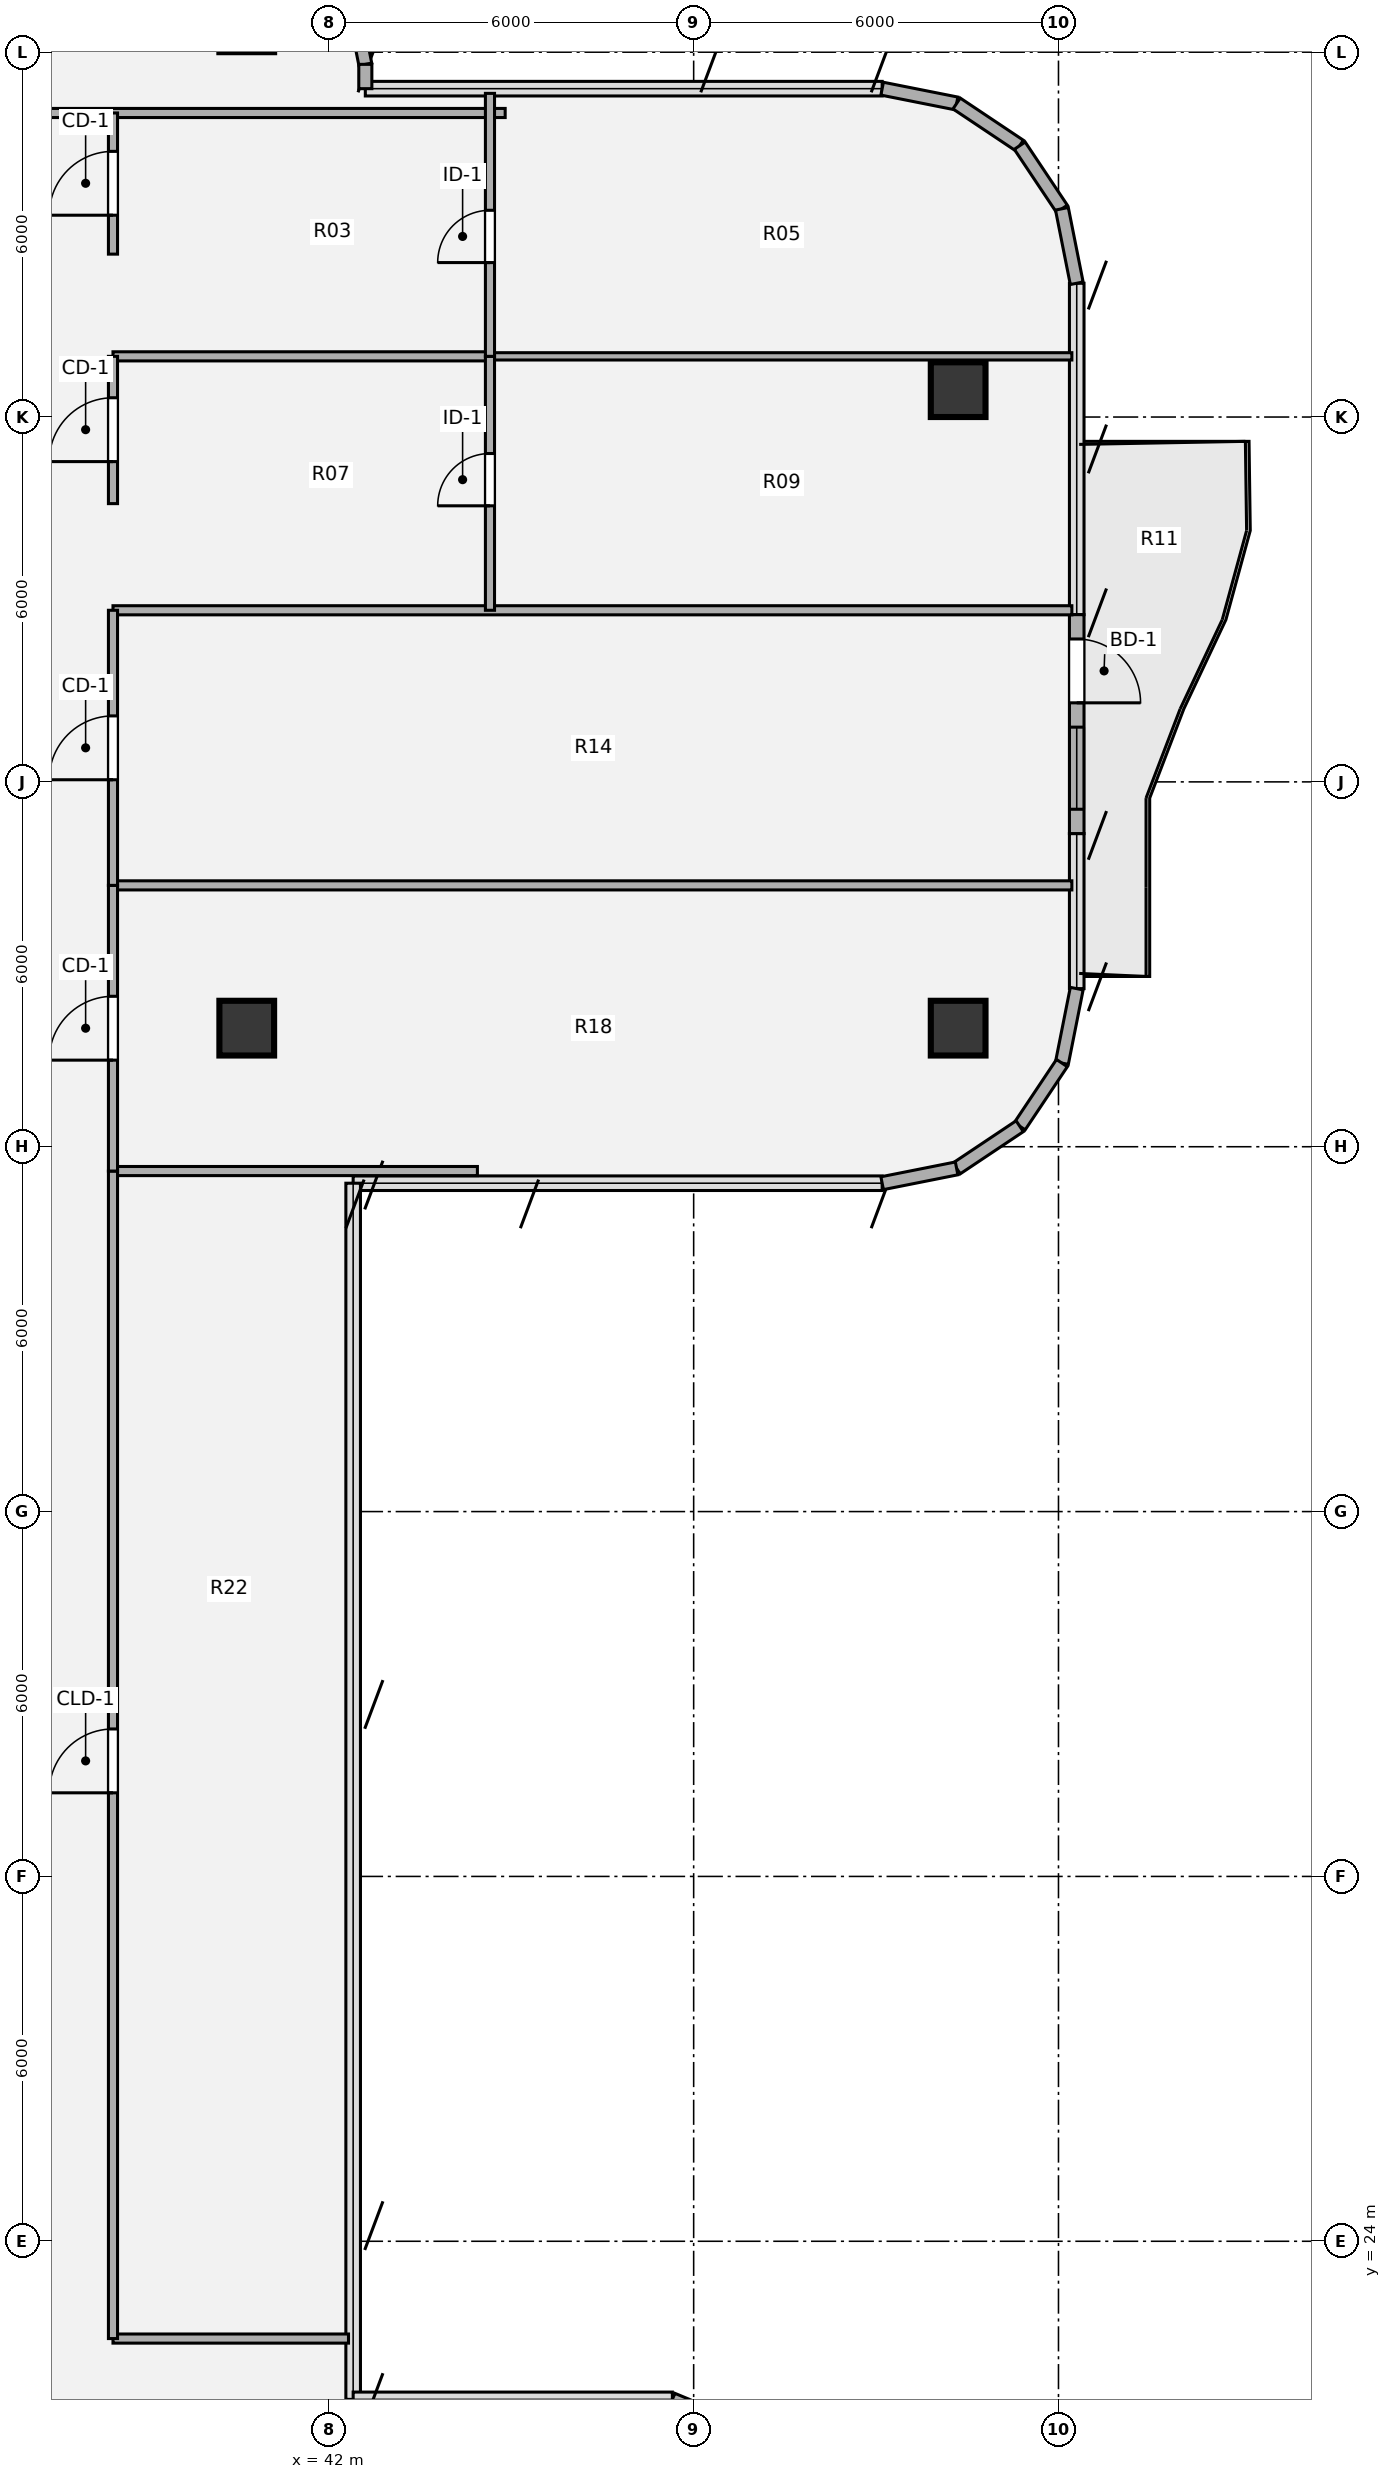
"""IFC4 building model, lengths in metres.
Left out: names, types, materials, properties, quantities, classifications, styles, units other than length and angle.
Written with IfcOpenShell. Run it as: python <this file> out.ifc"""

import sys

from ifc_helpers import new_model, si_unit, direction, frame, frame_2d, origin, origin_2d, place, context, subcontext, project, spatial, rectangle, hollow_circle, extrude, source, transform, mapped, element, fill, save


model = new_model("IFC4")
c1 = context("Model", 3, precision=1e-05, world=origin(), true_north=direction((0.0, 1.0)))
c2 = subcontext(c1, "Body", "Model", "MODEL_VIEW")
j1 = project(units=[si_unit("LENGTHUNIT", "METRE"), si_unit("PLANEANGLEUNIT", "RADIAN")], contexts=[c1])
p1 = place(None, origin())
s1 = spatial("IfcSite", under=j1, at=p1, CompositionType="ELEMENT")
p2 = place(p1, origin())
s2 = spatial("IfcBuilding", under=s1, at=p2, CompositionType="ELEMENT")
p3 = place(p2, frame((0.0, 0.0, 268.38)))
s3 = spatial("IfcBuildingStorey", under=s2, at=p3, CompositionType="ELEMENT", Elevation=268.38)
m1 = source(origin(), c2, "Body", "SweptSolid", [
    extrude(hollow_circle(Radius=0.45, WallThickness=0.032, at=origin_2d()), origin(), (0.0, 0.0, 1.0), 3.78),
])
for number, where, z_axis, x_axis in (
    (1, (52.35, 43.95, 0.0), (0.0, 0.0, 1.0), (1.0, 0.0, 0.0)),
    (2, (52.35, 54.45, 0.0), (0.0, 0.0, 1.0), (1.0, 0.0, 0.0)),
    (3, (40.65, 43.95, 0.0), (0.0, 0.0, 1.0), (1.0, 0.0, 0.0)),
):
    element("IfcColumn", number, at=place(p3, frame(where, z_axis=z_axis, x_axis=x_axis)), inside=s3, PredefinedType="COLUMN", context=c2, shape_type="MappedRepresentation", body=[
        mapped(m1, transform((0.0, 0.0, 0.0), x_axis=(1.0, 0.0, 0.0), y_axis=(0.0, 1.0, 0.0), z_axis=(0.0, 0.0, 1.0), scale=1.0)),
    ])
p4 = place(p3, frame((42.402, 60.795, 0.0), z_axis=(0.0, 0.0, 1.0), x_axis=(0.195190360752, -0.980765376158, 0.0)))
e4 = element("IfcWall", 4, at=p4, inside=s3, PredefinedType="SOLIDWALL", context=c2, shape_type="SweptSolid", body=[
    extrude(rectangle(XDim=1.014, YDim=0.215, at=frame_2d((0.507, 0.0))), origin(), (0.0, 0.0, 1.0), 3.53),
])
p5 = place(p3, frame((42.6, 59.8, 0.0), z_axis=(0.0, 0.0, 1.0), x_axis=(0.0, -1.0, 0.0)))
e5 = element("IfcWall", 5, at=p5, inside=s3, PredefinedType="SOLIDWALL", context=c2, shape_type="SweptSolid", body=[
    extrude(rectangle(XDim=0.4, YDim=0.215, at=frame_2d((0.2, 0.0))), origin(), (0.0, 0.0, 1.0), 3.53),
])
for number, where, z_axis, x_axis in (
    (6, (51.1, 59.4, 0.0), (0.0, 0.0, 1.0), (0.981, -0.195, 0.0)),
    (7, (52.325, 59.156, 0.0), (0.0, 0.0, 1.0), (0.831, -0.556, 0.0)),
    (8, (53.363, 58.463, 0.0), (0.0, 0.0, 1.0), (0.556, -0.831, 0.0)),
    (9, (54.056, 57.425, 0.0), (0.0, 0.0, 1.0), (0.195, -0.981, 0.0)),
):
    element("IfcWall", number, at=place(p3, frame(where, z_axis=z_axis, x_axis=x_axis)), inside=s3, PredefinedType="SOLIDWALL", context=c2, shape_type="SweptSolid", body=[
        extrude(rectangle(XDim=1.249, YDim=0.215, at=frame_2d((0.624, 0.0))), origin(), (0.0, 0.0, 1.0), 3.53),
    ])
p6 = place(p3, frame((54.3, 50.75, 0.0), z_axis=(0.0, 0.0, 1.0), x_axis=(0.0, -1.0, 0.0)))
e10 = element("IfcWall", 10, at=p6, inside=s3, PredefinedType="SOLIDWALL", context=c2, shape_type="SweptSolid", body=[
    extrude(rectangle(XDim=3.6, YDim=0.24, at=frame_2d((1.8, 0.0))), origin(), (0.0, 0.0, 1.0), 3.53),
])
p7 = place(p6, frame((0.4, 0.0, 0.0)))
e11 = element("IfcOpeningElement", 11, at=p7, cuts=e10, PredefinedType="OPENING", context=c2, shape_type="SweptSolid", body=[
    extrude(rectangle(XDim=1.05, YDim=2.15, at=origin_2d()), frame((0.525, 0.13, 1.075), z_axis=(0.0, -1.0, 0.0), x_axis=(1.0, 0.0, 0.0)), (0.0, 0.0, 1.0), 0.26),
])
p8 = place(p6, frame((1.85, 0.0, 0.85)))
e12 = element("IfcOpeningElement", 12, at=p8, cuts=e10, PredefinedType="OPENING", context=c2, shape_type="SweptSolid", body=[
    extrude(rectangle(XDim=1.35, YDim=1.35, at=origin_2d()), frame((0.675, 0.13, 0.675), z_axis=(0.0, -1.0, 0.0), x_axis=(1.0, 0.0, 0.0)), (0.0, 0.0, 1.0), 0.26),
])
for number, where, z_axis, x_axis in (
    (13, (54.3, 44.6, 0.0), (0.0, 0.0, 1.0), (-0.195, -0.981, 0.0)),
    (14, (54.056, 43.375, 0.0), (0.0, 0.0, 1.0), (-0.556, -0.831, 0.0)),
    (15, (53.363, 42.337, 0.0), (0.0, 0.0, 1.0), (-0.831, -0.556, 0.0)),
    (16, (52.325, 41.644, 0.0), (0.0, 0.0, 1.0), (-0.981, -0.195, 0.0)),
):
    element("IfcWall", number, at=place(p3, frame(where, z_axis=z_axis, x_axis=x_axis)), inside=s3, PredefinedType="SOLIDWALL", context=c2, shape_type="SweptSolid", body=[
        extrude(rectangle(XDim=1.249, YDim=0.215, at=frame_2d((0.624, 0.0))), origin(), (0.0, 0.0, 1.0), 3.53),
    ])
p9 = place(p3, frame((47.65, 21.4, 0.0), z_axis=(0.0, 0.0, 1.0), x_axis=(0.924205486139, -0.381895560841, 0.0)))
e17 = element("IfcWall", 17, at=p9, inside=s3, PredefinedType="SOLIDWALL", context=c2, shape_type="SweptSolid", body=[
    extrude(rectangle(XDim=0.268, YDim=0.215, at=frame_2d((0.134, 0.0))), origin(), (0.0, 0.0, 1.0), 3.53),
])
p10 = place(p3, frame((38.45, 22.4, 0.0), z_axis=(0.0, 0.0, 1.0), x_axis=(1.0, 0.0, 0.0)))
e18 = element("IfcWall", 18, at=p10, inside=s3, PredefinedType="PARTITIONING", context=c2, shape_type="SweptSolid", body=[
    extrude(rectangle(XDim=3.873, YDim=0.15, at=frame_2d((1.937, 0.0))), origin(), (0.0, 0.0, 1.0), 3.5),
])
p11 = place(p3, frame((38.45, 41.6, 0.0), z_axis=(0.0, 0.0, 1.0), x_axis=(1.0, 0.0, 0.0)))
e19 = element("IfcWall", 19, at=p11, inside=s3, PredefinedType="PARTITIONING", context=c2, shape_type="SweptSolid", body=[
    extrude(rectangle(XDim=5.993, YDim=0.15, at=frame_2d((2.997, 0.0))), origin(), (0.0, 0.0, 1.0), 3.5),
])
p12 = place(p3, frame((38.45, 46.298, 0.0), z_axis=(0.0, 0.0, 1.0), x_axis=(1.0, 0.0, 0.0)))
e20 = element("IfcWall", 20, at=p12, inside=s3, PredefinedType="PARTITIONING", context=c2, shape_type="SweptSolid", body=[
    extrude(rectangle(XDim=15.77, YDim=0.15, at=frame_2d((7.885, 0.0))), origin(), (0.0, 0.0, 1.0), 3.055),
])
p13 = place(p3, frame((38.45, 50.822, 0.0), z_axis=(0.0, 0.0, 1.0), x_axis=(1.0, 0.0, 0.0)))
e21 = element("IfcWall", 21, at=p13, inside=s3, PredefinedType="PARTITIONING", context=c2, shape_type="SweptSolid", body=[
    extrude(rectangle(XDim=15.77, YDim=0.15, at=frame_2d((7.885, 0.0))), origin(), (0.0, 0.0, 1.0), 2.982),
])
p14 = place(p3, frame((38.45, 54.998, 0.0), z_axis=(0.0, 0.0, 1.0), x_axis=(1.0, 0.0, 0.0)))
e22 = element("IfcWall", 22, at=p14, inside=s3, PredefinedType="PARTITIONING", context=c2, shape_type="SweptSolid", body=[
    extrude(rectangle(XDim=6.2, YDim=0.15, at=frame_2d((3.1, 0.0))), origin(), (0.0, 0.0, 1.0), 3.259),
])
p15 = place(p3, frame((44.65, 54.998, 0.0), z_axis=(0.0, 0.0, 1.0), x_axis=(1.0, 0.0, 0.0)))
e23 = element("IfcWall", 23, at=p15, inside=s3, PredefinedType="PARTITIONING", context=c2, shape_type="SweptSolid", body=[
    extrude(rectangle(XDim=9.57, YDim=0.12, at=frame_2d((4.785, 0.0))), origin(), (0.0, 0.0, 1.0), 3.5),
])
p16 = place(p3, frame((27.1, 59.0, 0.0), z_axis=(0.0, 0.0, 1.0), x_axis=(1.0, 0.0, 0.0)))
e24 = element("IfcWall", 24, at=p16, inside=s3, PredefinedType="PARTITIONING", context=c2, shape_type="SweptSolid", body=[
    extrude(rectangle(XDim=17.8, YDim=0.15, at=frame_2d((8.9, 0.0))), origin(), (0.0, 0.0, 1.0), 3.308),
])
p17 = place(p16, frame((8.375, 0.0, 0.0)))
e25 = element("IfcOpeningElement", 25, at=p17, cuts=e24, PredefinedType="OPENING", context=c2, shape_type="SweptSolid", body=[
    extrude(rectangle(XDim=1.05, YDim=2.1, at=origin_2d()), frame((0.525, 0.085, 1.05), z_axis=(0.0, -1.0, 0.0), x_axis=(1.0, 0.0, 0.0)), (0.0, 0.0, 1.0), 0.17),
])
p18 = place(p3, frame((38.45, 22.4, 0.0), z_axis=(0.0, 0.0, 1.0), x_axis=(0.0, 1.0, 0.0)))
e26 = element("IfcWall", 26, at=p18, inside=s3, PredefinedType="PARTITIONING", context=c2, shape_type="SweptSolid", body=[
    extrude(rectangle(XDim=19.2, YDim=0.15, at=frame_2d((9.6, 0.0))), origin(), (0.0, 0.0, 1.0), 3.5),
])
p19 = place(p18, frame((8.975, 0.0, 0.0)))
e27 = element("IfcOpeningElement", 27, at=p19, cuts=e26, PredefinedType="OPENING", context=c2, shape_type="SweptSolid", body=[
    extrude(rectangle(XDim=1.05, YDim=2.1, at=origin_2d()), frame((0.525, 0.085, 1.05), z_axis=(0.0, -1.0, 0.0), x_axis=(1.0, 0.0, 0.0)), (0.0, 0.0, 1.0), 0.17),
])
p20 = place(p3, frame((38.45, 41.6, 0.0), z_axis=(0.0, 0.0, 1.0), x_axis=(0.0, 1.0, 0.0)))
e28 = element("IfcWall", 28, at=p20, inside=s3, PredefinedType="PARTITIONING", context=c2, shape_type="SweptSolid", body=[
    extrude(rectangle(XDim=4.698, YDim=0.15, at=frame_2d((2.349, 0.0))), origin(), (0.0, 0.0, 1.0), 3.5),
])
p21 = place(p20, frame((1.824, 0.0, 0.0)))
e29 = element("IfcOpeningElement", 29, at=p21, cuts=e28, PredefinedType="OPENING", context=c2, shape_type="SweptSolid", body=[
    extrude(rectangle(XDim=1.05, YDim=2.1, at=origin_2d()), frame((0.525, 0.085, 1.05), z_axis=(0.0, -1.0, 0.0), x_axis=(1.0, 0.0, 0.0)), (0.0, 0.0, 1.0), 0.17),
])
p22 = place(p3, frame((38.45, 46.298, 0.0), z_axis=(0.0, 0.0, 1.0), x_axis=(0.0, 1.0, 0.0)))
e30 = element("IfcWall", 30, at=p22, inside=s3, PredefinedType="PARTITIONING", context=c2, shape_type="SweptSolid", body=[
    extrude(rectangle(XDim=4.524, YDim=0.15, at=frame_2d((2.262, 0.0))), origin(), (0.0, 0.0, 1.0), 3.5),
])
p23 = place(p22, frame((1.737, 0.0, 0.0)))
e31 = element("IfcOpeningElement", 31, at=p23, cuts=e30, PredefinedType="OPENING", context=c2, shape_type="SweptSolid", body=[
    extrude(rectangle(XDim=1.05, YDim=2.1, at=origin_2d()), frame((0.525, 0.085, 1.05), z_axis=(0.0, -1.0, 0.0), x_axis=(1.0, 0.0, 0.0)), (0.0, 0.0, 1.0), 0.17),
])
p24 = place(p3, frame((38.45, 52.576, 0.0), z_axis=(0.0, 0.0, 1.0), x_axis=(0.0, 1.0, 0.0)))
e32 = element("IfcWall", 32, at=p24, inside=s3, PredefinedType="PARTITIONING", context=c2, shape_type="SweptSolid", body=[
    extrude(rectangle(XDim=2.422, YDim=0.15, at=frame_2d((1.211, 0.0))), origin(), (0.0, 0.0, 1.0), 3.5),
])
p25 = place(p24, frame((0.691, 0.0, 0.0)))
e33 = element("IfcOpeningElement", 33, at=p25, cuts=e32, PredefinedType="OPENING", context=c2, shape_type="SweptSolid", body=[
    extrude(rectangle(XDim=1.05, YDim=2.1, at=origin_2d()), frame((0.525, 0.085, 1.05), z_axis=(0.0, -1.0, 0.0), x_axis=(1.0, 0.0, 0.0)), (0.0, 0.0, 1.0), 0.17),
])
p26 = place(p3, frame((38.45, 56.679, 0.0), z_axis=(0.0, 0.0, 1.0), x_axis=(0.0, 1.0, 0.0)))
e34 = element("IfcWall", 34, at=p26, inside=s3, PredefinedType="PARTITIONING", context=c2, shape_type="SweptSolid", body=[
    extrude(rectangle(XDim=2.321, YDim=0.15, at=frame_2d((1.161, 0.0))), origin(), (0.0, 0.0, 1.0), 3.5),
])
p27 = place(p26, frame((0.64, 0.0, 0.0)))
e35 = element("IfcOpeningElement", 35, at=p27, cuts=e34, PredefinedType="OPENING", context=c2, shape_type="SweptSolid", body=[
    extrude(rectangle(XDim=1.05, YDim=2.1, at=origin_2d()), frame((0.525, 0.085, 1.05), z_axis=(0.0, -1.0, 0.0), x_axis=(1.0, 0.0, 0.0)), (0.0, 0.0, 1.0), 0.17),
])
p28 = place(p3, frame((44.65, 50.822, 0.0), z_axis=(0.0, 0.0, 1.0), x_axis=(0.0, 1.0, 0.0)))
e36 = element("IfcWall", 36, at=p28, inside=s3, PredefinedType="PARTITIONING", context=c2, shape_type="SweptSolid", body=[
    extrude(rectangle(XDim=4.176, YDim=0.15, at=frame_2d((2.088, 0.0))), origin(), (0.0, 0.0, 1.0), 3.5),
])
p29 = place(p28, frame((1.718, 0.0, 0.0)))
e37 = element("IfcOpeningElement", 37, at=p29, cuts=e36, PredefinedType="OPENING", context=c2, shape_type="SweptSolid", body=[
    extrude(rectangle(XDim=0.86, YDim=2.1, at=origin_2d()), frame((0.43, 0.085, 1.05), z_axis=(0.0, -1.0, 0.0), x_axis=(1.0, 0.0, 0.0)), (0.0, 0.0, 1.0), 0.17),
])
p30 = place(p3, frame((44.65, 54.998, 0.0), z_axis=(0.0, 0.0, 1.0), x_axis=(0.0, 1.0, 0.0)))
e38 = element("IfcWall", 38, at=p30, inside=s3, PredefinedType="PARTITIONING", context=c2, shape_type="SweptSolid", body=[
    extrude(rectangle(XDim=4.324, YDim=0.15, at=frame_2d((2.162, 0.0))), origin(), (0.0, 0.0, 1.0), 3.5),
])
p31 = place(p30, frame((1.542, 0.0, 0.0)))
e39 = element("IfcOpeningElement", 39, at=p31, cuts=e38, PredefinedType="OPENING", context=c2, shape_type="SweptSolid", body=[
    extrude(rectangle(XDim=0.86, YDim=2.1, at=origin_2d()), frame((0.43, 0.085, 1.05), z_axis=(0.0, -1.0, 0.0), x_axis=(1.0, 0.0, 0.0)), (0.0, 0.0, 1.0), 0.17),
])
m2 = source(origin(), c2, "Body", "SweptSolid", [
    extrude(rectangle(XDim=1.05, YDim=2.15, at=origin_2d()), frame((0.525, 0.025, 1.075), z_axis=(0.0, -1.0, 0.0), x_axis=(1.0, 0.0, 0.0)), (0.0, 0.0, 1.0), 0.05),
])
p32 = place(p7, origin())
e40 = element("IfcDoor", 40, at=p32, inside=s3, OperationType="SINGLE_SWING_RIGHT", PredefinedType="DOOR", context=c2, shape_type="MappedRepresentation", body=[
    mapped(m2, transform((0.0, 0.0, 0.0), x_axis=(1.0, 0.0, 0.0), y_axis=(0.0, 1.0, 0.0), z_axis=(0.0, 0.0, 1.0), scale=1.0)),
])
fill(e11, e40)
m3 = source(origin(), c2, "Body", "SweptSolid", [
    extrude(rectangle(XDim=1.35, YDim=1.35, at=origin_2d()), frame((0.675, 0.03, 0.675), z_axis=(0.0, -1.0, 0.0), x_axis=(1.0, 0.0, 0.0)), (0.0, 0.0, 1.0), 0.06),
])
p33 = place(p8, origin())
e41 = element("IfcWindow", 41, at=p33, inside=s3, PartitioningType="SINGLE_PANEL", PredefinedType="WINDOW", context=c2, shape_type="MappedRepresentation", body=[
    mapped(m3, transform((0.0, 0.0, 0.0), x_axis=(1.0, 0.0, 0.0), y_axis=(0.0, 1.0, 0.0), z_axis=(0.0, 0.0, 1.0), scale=1.0)),
])
fill(e12, e41)
m4 = source(origin(), c2, "Body", "SweptSolid", [
    extrude(rectangle(XDim=1.05, YDim=2.1, at=origin_2d()), frame((0.525, 0.025, 1.05), z_axis=(0.0, -1.0, 0.0), x_axis=(1.0, 0.0, 0.0)), (0.0, 0.0, 1.0), 0.05),
])
p34 = place(p19, origin())
e42 = element("IfcDoor", 42, at=p34, inside=s3, OperationType="SINGLE_SWING_LEFT", PredefinedType="DOOR", context=c2, shape_type="MappedRepresentation", body=[
    mapped(m4, transform((0.0, 0.0, 0.0), x_axis=(1.0, 0.0, 0.0), y_axis=(0.0, 1.0, 0.0), z_axis=(0.0, 0.0, 1.0), scale=1.0)),
])
fill(e27, e42)
m5 = source(origin(), c2, "Body", "SweptSolid", [
    extrude(rectangle(XDim=1.05, YDim=2.1, at=origin_2d()), frame((0.525, 0.025, 1.05), z_axis=(0.0, -1.0, 0.0), x_axis=(1.0, 0.0, 0.0)), (0.0, 0.0, 1.0), 0.05),
])
p35 = place(p21, origin())
e43 = element("IfcDoor", 43, at=p35, inside=s3, OperationType="SINGLE_SWING_LEFT", PredefinedType="DOOR", context=c2, shape_type="MappedRepresentation", body=[
    mapped(m5, transform((0.0, 0.0, 0.0), x_axis=(1.0, 0.0, 0.0), y_axis=(0.0, 1.0, 0.0), z_axis=(0.0, 0.0, 1.0), scale=1.0)),
])
fill(e29, e43)
p36 = place(p23, origin())
e44 = element("IfcDoor", 44, at=p36, inside=s3, OperationType="SINGLE_SWING_LEFT", PredefinedType="DOOR", context=c2, shape_type="MappedRepresentation", body=[
    mapped(m5, transform((0.0, 0.0, 0.0), x_axis=(1.0, 0.0, 0.0), y_axis=(0.0, 1.0, 0.0), z_axis=(0.0, 0.0, 1.0), scale=1.0)),
])
fill(e31, e44)
p37 = place(p25, origin())
e45 = element("IfcDoor", 45, at=p37, inside=s3, OperationType="SINGLE_SWING_LEFT", PredefinedType="DOOR", context=c2, shape_type="MappedRepresentation", body=[
    mapped(m5, transform((0.0, 0.0, 0.0), x_axis=(1.0, 0.0, 0.0), y_axis=(0.0, 1.0, 0.0), z_axis=(0.0, 0.0, 1.0), scale=1.0)),
])
fill(e33, e45)
p38 = place(p27, origin())
e46 = element("IfcDoor", 46, at=p38, inside=s3, OperationType="SINGLE_SWING_LEFT", PredefinedType="DOOR", context=c2, shape_type="MappedRepresentation", body=[
    mapped(m5, transform((0.0, 0.0, 0.0), x_axis=(1.0, 0.0, 0.0), y_axis=(0.0, 1.0, 0.0), z_axis=(0.0, 0.0, 1.0), scale=1.0)),
])
fill(e35, e46)
m6 = source(origin(), c2, "Body", "SweptSolid", [
    extrude(rectangle(XDim=0.86, YDim=2.1, at=origin_2d()), frame((0.43, 0.025, 1.05), z_axis=(0.0, -1.0, 0.0), x_axis=(1.0, 0.0, 0.0)), (0.0, 0.0, 1.0), 0.05),
])
p39 = place(p29, origin())
e47 = element("IfcDoor", 47, at=p39, inside=s3, OperationType="SINGLE_SWING_LEFT", PredefinedType="DOOR", context=c2, shape_type="MappedRepresentation", body=[
    mapped(m6, transform((0.0, 0.0, 0.0), x_axis=(1.0, 0.0, 0.0), y_axis=(0.0, 1.0, 0.0), z_axis=(0.0, 0.0, 1.0), scale=1.0)),
])
fill(e37, e47)
p40 = place(p31, origin())
e48 = element("IfcDoor", 48, at=p40, inside=s3, OperationType="SINGLE_SWING_LEFT", PredefinedType="DOOR", context=c2, shape_type="MappedRepresentation", body=[
    mapped(m6, transform((0.0, 0.0, 0.0), x_axis=(1.0, 0.0, 0.0), y_axis=(0.0, 1.0, 0.0), z_axis=(0.0, 0.0, 1.0), scale=1.0)),
])
fill(e39, e48)
save(model, sys.argv[1])
